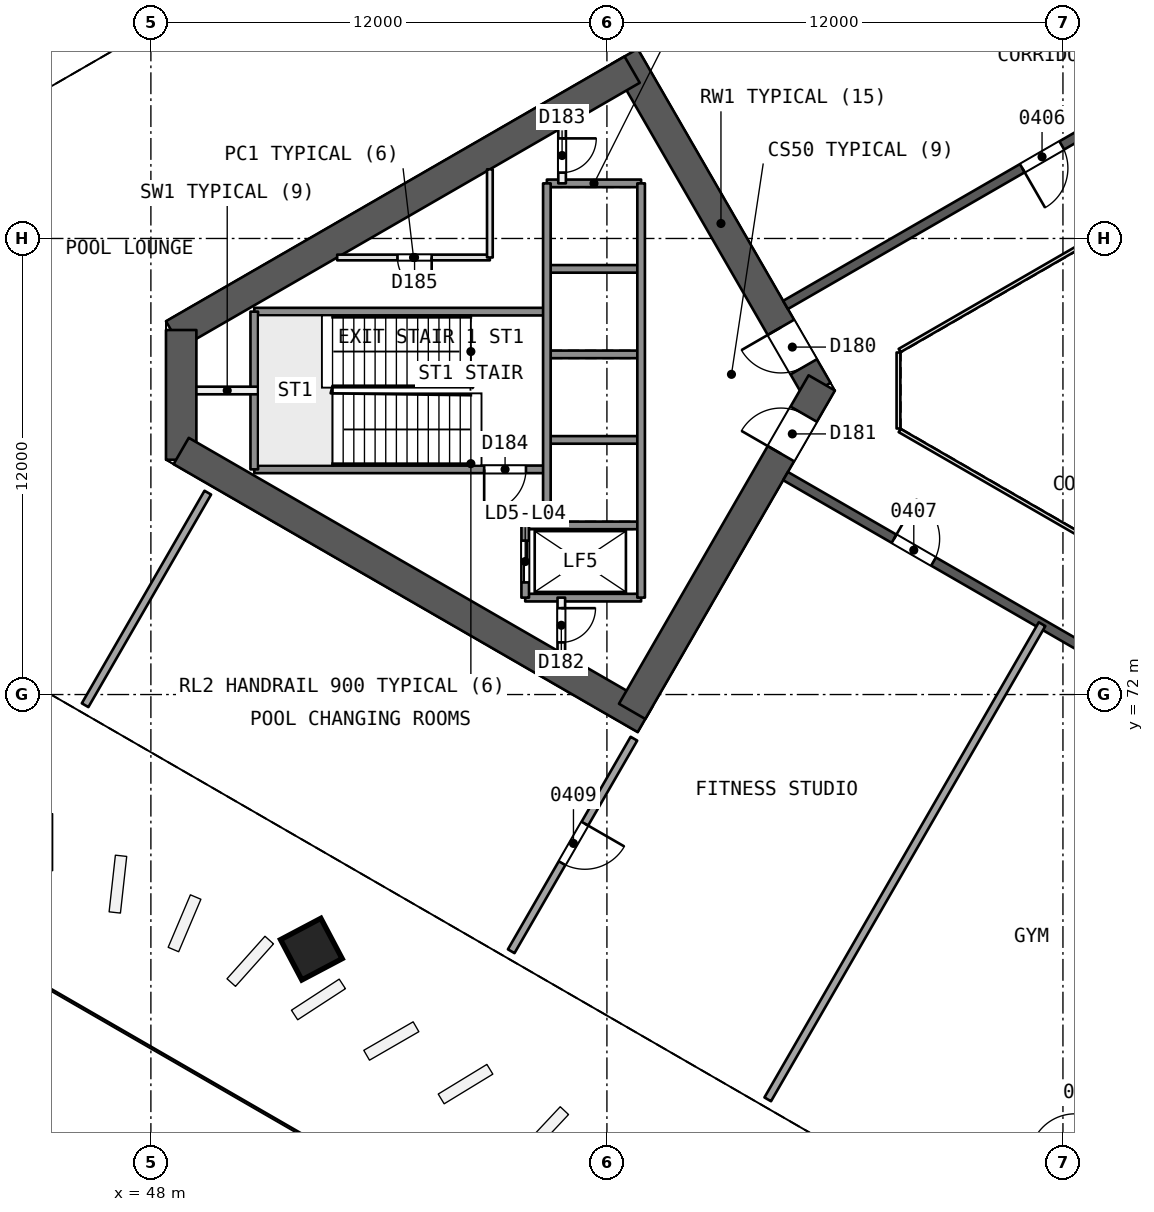
"""IFC4 building model, lengths in metres.
Left out: names, types, materials, properties, quantities, classifications, styles, units other than length and angle.
Written with IfcOpenShell. Run it as: python <this file> out.ifc"""

import sys

from ifc_helpers import new_model, si_unit, direction, frame, frame_2d, origin, origin_2d, place, context, subcontext, project, spatial, rectangle, extrude, element, fill, save


model = new_model("IFC4")
c1 = context("Model", 3, precision=1e-05, world=origin(), true_north=direction((0.0, 1.0)))
c2 = subcontext(c1, "Body", "Model", "MODEL_VIEW")
j1 = project(units=[si_unit("LENGTHUNIT", "METRE"), si_unit("PLANEANGLEUNIT", "RADIAN")], contexts=[c1])
p1 = place(None, origin())
s1 = spatial("IfcSite", under=j1, at=p1, CompositionType="ELEMENT")
p2 = place(p1, origin())
s2 = spatial("IfcBuilding", under=s1, at=p2, CompositionType="ELEMENT")
p3 = place(p2, frame((0.0, 0.0, 25.4)))
s3 = spatial("IfcBuildingStorey", under=s2, at=p3, CompositionType="ELEMENT", Elevation=25.4)
p4 = place(p3, frame((65.538, 80.0, 0.0), z_axis=(0.0, 0.0, 1.0), x_axis=(-0.49999662545, 0.866027352073, 0.0)))
e1 = element("IfcWall", 1, at=p4, inside=s3, PredefinedType="SHEAR", context=c2, shape_type="SweptSolid", body=[
    extrude(rectangle(XDim=10.149, YDim=0.8, at=frame_2d((5.074, 0.0))), origin(), (0.0, 0.0, 1.0), 4.6),
])
p5 = place(p4, frame((0.719, 0.0, 0.0)))
e2 = element("IfcOpeningElement", 2, at=p5, cuts=e1, PredefinedType="OPENING", context=c2, shape_type="SweptSolid", body=[
    extrude(rectangle(XDim=1.2, YDim=2.1, at=frame_2d((0.6, 1.05))), frame((0.0, 0.411, 0.0), z_axis=(0.0, -1.0, 0.0), x_axis=(1.0, 0.0, 0.0)), (0.0, 0.0, 1.0), 0.821),
])
p6 = place(p3, frame((60.664, 88.443, 0.0), z_axis=(0.0, 0.0, 1.0), x_axis=(-0.866029478545, -0.499992942241, 0.0)))
e3 = element("IfcWall", 3, at=p6, inside=s3, PredefinedType="SHEAR", context=c2, shape_type="SweptSolid", body=[
    extrude(rectangle(XDim=13.933, YDim=0.8, at=frame_2d((6.967, 0.0))), origin(), (0.0, 0.0, 1.0), 4.6),
])
p7 = place(p3, frame((48.797, 81.592, 0.0), z_axis=(0.0, 0.0, 1.0), x_axis=(0.0, -1.0, 0.0)))
e4 = element("IfcWall", 4, at=p7, inside=s3, PredefinedType="SHEAR", context=c2, shape_type="SweptSolid", body=[
    extrude(rectangle(XDim=3.415, YDim=0.8, at=frame_2d((1.707, 0.0))), origin(), (0.0, 0.0, 1.0), 4.6),
])
p8 = place(p3, frame((48.797, 78.408, 0.0), z_axis=(0.0, 0.0, 1.0), x_axis=(0.866032504327, -0.499987701298, 0.0)))
e5 = element("IfcWall", 5, at=p8, inside=s3, PredefinedType="SHEAR", context=c2, shape_type="SweptSolid", body=[
    extrude(rectangle(XDim=14.102, YDim=0.8, at=frame_2d((7.051, 0.0))), origin(), (0.0, 0.0, 1.0), 4.6),
])
p9 = place(p3, frame((60.664, 71.557, 0.0), z_axis=(0.0, 0.0, 1.0), x_axis=(0.50000409368, 0.866023040284, 0.0)))
e6 = element("IfcWall", 6, at=p9, inside=s3, PredefinedType="SHEAR", context=c2, shape_type="SweptSolid", body=[
    extrude(rectangle(XDim=9.98, YDim=0.8, at=frame_2d((4.99, 0.0))), origin(), (0.0, 0.0, 1.0), 4.6),
])
p10 = place(p9, frame((7.83, 0.0, 0.0)))
e7 = element("IfcOpeningElement", 7, at=p10, cuts=e6, PredefinedType="OPENING", context=c2, shape_type="SweptSolid", body=[
    extrude(rectangle(XDim=1.2, YDim=2.1, at=frame_2d((0.6, 1.05))), frame((0.0, 0.411, 0.0), z_axis=(0.0, -1.0, 0.0), x_axis=(1.0, 0.0, 0.0)), (0.0, 0.0, 1.0), 0.821),
])
p11 = place(p3, frame((78.2, 90.046, 0.0), z_axis=(0.0, 0.0, 1.0), x_axis=(-0.866026492143, -0.499998114903, 0.0)))
e8 = element("IfcWall", 8, at=p11, inside=s3, PredefinedType="SHEAR", context=c2, shape_type="SweptSolid", body=[
    extrude(rectangle(XDim=15.588, YDim=0.25, at=frame_2d((7.794, 0.0))), origin(), (0.0, 0.0, 1.0), 4.1),
])
p12 = place(p11, frame((7.194, 0.0, 0.0)))
e9 = element("IfcOpeningElement", 9, at=p12, cuts=e8, PredefinedType="OPENING", context=c2, shape_type="SweptSolid", body=[
    extrude(rectangle(XDim=1.2, YDim=2.4, at=frame_2d((0.6, 1.2))), frame((0.0, 0.135, 0.0), z_axis=(0.0, -1.0, 0.0), x_axis=(1.0, 0.0, 0.0)), (0.0, 0.0, 1.0), 0.271),
])
p13 = place(p3, frame((64.7, 77.748, 0.0), z_axis=(0.0, 0.0, 1.0), x_axis=(0.866026492143, -0.499998114903, 0.0)))
e10 = element("IfcWall", 10, at=p13, inside=s3, PredefinedType="SHEAR", context=c2, shape_type="SweptSolid", body=[
    extrude(rectangle(XDim=15.588, YDim=0.25, at=frame_2d((7.794, 0.0))), origin(), (0.0, 0.0, 1.0), 4.1),
])
p14 = place(p13, frame((3.297, 0.0, 0.0)))
e11 = element("IfcOpeningElement", 11, at=p14, cuts=e10, PredefinedType="OPENING", context=c2, shape_type="SweptSolid", body=[
    extrude(rectangle(XDim=1.2, YDim=2.4, at=frame_2d((0.6, 1.2))), frame((0.0, 0.135, 0.0), z_axis=(0.0, -1.0, 0.0), x_axis=(1.0, 0.0, 0.0)), (0.0, 0.0, 1.0), 0.271),
])
p15 = place(p13, frame((11.091, 0.0, 0.0)))
e12 = element("IfcOpeningElement", 12, at=p15, cuts=e10, PredefinedType="OPENING", context=c2, shape_type="SweptSolid", body=[
    extrude(rectangle(XDim=1.2, YDim=2.4, at=frame_2d((0.6, 1.2))), frame((0.0, 0.135, 0.0), z_axis=(0.0, -1.0, 0.0), x_axis=(1.0, 0.0, 0.0)), (0.0, 0.0, 1.0), 0.271),
])
p16 = place(p3, frame((52.199, 65.286, 0.0), z_axis=(0.01931351395, 0.012150534875, 0.999739642448), x_axis=(-0.866097413728, 0.49976162466, 0.010657788268)))
e13 = element("IfcColumn", 13, at=p16, inside=s3, PredefinedType="COLUMN", context=c2, shape_type="SweptSolid", body=[
    extrude(rectangle(XDim=1.2, YDim=1.2, at=origin_2d()), origin(), (0.0, 0.0, 1.0), 4.601),
])
p17 = place(p3, frame((64.231, 61.349, 0.0), z_axis=(0.0, 0.0, 1.0), x_axis=(0.500003999814, 0.866023094479, 0.0)))
e14 = element("IfcWall", 14, at=p17, inside=s3, PredefinedType="PARTITIONING", context=c2, shape_type="SweptSolid", body=[
    extrude(rectangle(XDim=14.437, YDim=0.2, at=frame_2d((7.219, 0.0))), origin(), (0.0, 0.0, 1.0), 4.1),
])
p18 = place(p3, frame((60.71, 70.838, 0.0), z_axis=(0.0, 0.0, 1.0), x_axis=(-0.500001702147, -0.866024421047, 0.0)))
e15 = element("IfcWall", 15, at=p18, inside=s3, PredefinedType="PARTITIONING", context=c2, shape_type="SweptSolid", body=[
    extrude(rectangle(XDim=6.458, YDim=0.2, at=frame_2d((3.229, 0.0))), origin(), (0.0, 0.0, 1.0), 4.1),
])
p19 = place(p18, frame((2.582, 0.0, 0.0)))
e16 = element("IfcOpeningElement", 16, at=p19, cuts=e15, PredefinedType="OPENING", context=c2, shape_type="SweptSolid", body=[
    extrude(rectangle(XDim=1.2, YDim=2.4, at=frame_2d((0.6, 1.2))), frame((0.0, 0.11, 0.0), z_axis=(0.0, -1.0, 0.0), x_axis=(1.0, 0.0, 0.0)), (0.0, 0.0, 1.0), 0.221),
])
p20 = place(p3, frame((70.981, 57.451, 0.0), z_axis=(0.0, 0.0, 1.0), x_axis=(0.500001702147, 0.866024421047, 0.0)))
e17 = element("IfcWall", 17, at=p20, inside=s3, PredefinedType="PARTITIONING", context=c2, shape_type="SweptSolid", body=[
    extrude(rectangle(XDim=6.458, YDim=0.2, at=frame_2d((3.229, 0.0))), origin(), (0.0, 0.0, 1.0), 4.1),
])
p21 = place(p20, frame((2.675, 0.0, 0.0)))
e18 = element("IfcOpeningElement", 18, at=p21, cuts=e17, PredefinedType="OPENING", context=c2, shape_type="SweptSolid", body=[
    extrude(rectangle(XDim=1.2, YDim=2.4, at=frame_2d((0.6, 1.2))), frame((0.0, 0.11, 0.0), z_axis=(0.0, -1.0, 0.0), x_axis=(1.0, 0.0, 0.0)), (0.0, 0.0, 1.0), 0.221),
])
p22 = place(p3, frame((49.498, 77.312, 0.0), z_axis=(0.0, 0.0, 1.0), x_axis=(-0.49998971805, -0.86603133999, 0.0)))
e19 = element("IfcWall", 19, at=p22, inside=s3, PredefinedType="PARTITIONING", context=c2, shape_type="SweptSolid", body=[
    extrude(rectangle(XDim=6.458, YDim=0.2, at=frame_2d((3.229, 0.0))), origin(), (0.0, 0.0, 1.0), 4.1),
])
p23 = place(p3, frame((60.9, 85.45, 0.0), z_axis=(0.0, 0.0, 1.0), x_axis=(-1.0, 0.0, 0.0)))
e20 = element("IfcWall", 20, at=p23, inside=s3, PredefinedType="SOLIDWALL", context=c2, shape_type="SweptSolid", body=[
    extrude(rectangle(XDim=2.48, YDim=0.2, at=frame_2d((1.24, 0.0))), origin(), (0.0, 0.0, 1.0), 4.1),
])
p24 = place(p3, frame((56.92, 83.5, 0.0), z_axis=(0.0, 0.0, 1.0), x_axis=(-1.0, 0.0, 0.0)))
e21 = element("IfcWall", 21, at=p24, inside=s3, PredefinedType="PARTITIONING", context=c2, shape_type="SweptSolid", body=[
    extrude(rectangle(XDim=4.018, YDim=0.15, at=frame_2d((2.009, 0.0))), origin(), (0.0, 0.0, 1.0), 4.1),
])
p25 = place(p24, frame((1.531, 0.0, 0.0)))
e22 = element("IfcOpeningElement", 22, at=p25, cuts=e21, PredefinedType="OPENING", context=c2, shape_type="SweptSolid", body=[
    extrude(rectangle(XDim=0.9, YDim=2.1, at=frame_2d((0.45, 1.05))), frame((0.0, 0.085, 0.0), z_axis=(0.0, -1.0, 0.0), x_axis=(1.0, 0.0, 0.0)), (0.0, 0.0, 1.0), 0.171),
])
p26 = place(p3, frame((60.9, 83.2, 0.0), z_axis=(0.0, 0.0, 1.0), x_axis=(-1.0, 0.0, 0.0)))
e23 = element("IfcWall", 23, at=p26, inside=s3, PredefinedType="SOLIDWALL", context=c2, shape_type="SweptSolid", body=[
    extrude(rectangle(XDim=2.48, YDim=0.2, at=frame_2d((1.24, 0.0))), origin(), (0.0, 0.0, 1.0), 4.1),
])
p27 = place(p3, frame((58.42, 82.075, 0.0), z_axis=(0.0, 0.0, 1.0), x_axis=(-1.0, 0.0, 0.0)))
e24 = element("IfcWall", 24, at=p27, inside=s3, PredefinedType="SOLIDWALL", context=c2, shape_type="SweptSolid", body=[
    extrude(rectangle(XDim=7.7, YDim=0.2, at=frame_2d((3.85, 0.0))), origin(), (0.0, 0.0, 1.0), 4.1),
])
p28 = place(p3, frame((60.9, 80.95, 0.0), z_axis=(0.0, 0.0, 1.0), x_axis=(-1.0, 0.0, 0.0)))
e25 = element("IfcWall", 25, at=p28, inside=s3, PredefinedType="SOLIDWALL", context=c2, shape_type="SweptSolid", body=[
    extrude(rectangle(XDim=2.48, YDim=0.2, at=frame_2d((1.24, 0.0))), origin(), (0.0, 0.0, 1.0), 4.1),
])
p29 = place(p3, frame((50.82, 80.0, 0.0), z_axis=(0.0, 0.0, 1.0), x_axis=(-1.0, 0.0, 0.0)))
e26 = element("IfcWall", 26, at=p29, inside=s3, PredefinedType="PARTITIONING", context=c2, shape_type="SweptSolid", body=[
    extrude(rectangle(XDim=1.623, YDim=0.2, at=frame_2d((0.812, 0.0))), origin(), (0.0, 0.0, 1.0), 4.1),
])
p30 = place(p3, frame((60.9, 78.7, 0.0), z_axis=(0.0, 0.0, 1.0), x_axis=(-1.0, 0.0, 0.0)))
e27 = element("IfcWall", 27, at=p30, inside=s3, PredefinedType="SOLIDWALL", context=c2, shape_type="SweptSolid", body=[
    extrude(rectangle(XDim=2.48, YDim=0.2, at=frame_2d((1.24, 0.0))), origin(), (0.0, 0.0, 1.0), 4.1),
])
p31 = place(p3, frame((58.42, 77.925, 0.0), z_axis=(0.0, 0.0, 1.0), x_axis=(-1.0, 0.0, 0.0)))
e28 = element("IfcWall", 28, at=p31, inside=s3, PredefinedType="SOLIDWALL", context=c2, shape_type="SweptSolid", body=[
    extrude(rectangle(XDim=7.7, YDim=0.2, at=frame_2d((3.85, 0.0))), origin(), (0.0, 0.0, 1.0), 4.1),
])
p32 = place(p31, frame((0.55, 0.0, 0.0)))
e29 = element("IfcOpeningElement", 29, at=p32, cuts=e28, PredefinedType="OPENING", context=c2, shape_type="SweptSolid", body=[
    extrude(rectangle(XDim=1.1, YDim=2.1, at=frame_2d((0.55, 1.05))), frame((0.0, 0.11, 0.0), z_axis=(0.0, -1.0, 0.0), x_axis=(1.0, 0.0, 0.0)), (0.0, 0.0, 1.0), 0.221),
])
for number, where, z_axis, x_axis in (
    (30, (60.9, 76.45, 0.0), (0.0, 0.0, 1.0), (-1.0, 0.0, 0.0)),
    (31, (60.9, 74.55, 0.0), (0.0, 0.0, 1.0), (-1.0, 0.0, 0.0)),
):
    element("IfcWall", number, at=place(p3, frame(where, z_axis=z_axis, x_axis=x_axis)), inside=s3, PredefinedType="SOLIDWALL", context=c2, shape_type="SweptSolid", body=[
        extrude(rectangle(XDim=3.05, YDim=0.2, at=frame_2d((1.525, 0.0))), origin(), (0.0, 0.0, 1.0), 4.1),
    ])
p33 = place(p3, frame((60.9, 85.45, 0.0), z_axis=(0.0, 0.0, 1.0), x_axis=(0.0, -1.0, 0.0)))
e32 = element("IfcWall", 32, at=p33, inside=s3, PredefinedType="SOLIDWALL", context=c2, shape_type="SweptSolid", body=[
    extrude(rectangle(XDim=10.9, YDim=0.2, at=frame_2d((5.45, 0.0))), origin(), (0.0, 0.0, 1.0), 4.1),
])
p34 = place(p3, frame((58.82, 86.917, 0.0), z_axis=(0.0, 0.0, 1.0), x_axis=(0.0, -1.0, 0.0)))
e33 = element("IfcWall", 33, at=p34, inside=s3, PredefinedType="PARTITIONING", context=c2, shape_type="SweptSolid", body=[
    extrude(rectangle(XDim=1.467, YDim=0.2, at=frame_2d((0.733, 0.0))), origin(), (0.0, 0.0, 1.0), 4.1),
])
p35 = place(p34, frame((0.283, 0.0, 0.0)))
e34 = element("IfcOpeningElement", 34, at=p35, cuts=e33, PredefinedType="OPENING", context=c2, shape_type="SweptSolid", body=[
    extrude(rectangle(XDim=0.9, YDim=2.1, at=frame_2d((0.45, 1.05))), frame((0.0, 0.11, 0.0), z_axis=(0.0, -1.0, 0.0), x_axis=(1.0, 0.0, 0.0)), (0.0, 0.0, 1.0), 0.221),
])
p36 = place(p3, frame((58.8, 74.55, 0.0), z_axis=(0.0, 0.0, 1.0), x_axis=(0.0, -1.0, 0.0)))
e35 = element("IfcWall", 35, at=p36, inside=s3, PredefinedType="PARTITIONING", context=c2, shape_type="SweptSolid", body=[
    extrude(rectangle(XDim=1.455, YDim=0.2, at=frame_2d((0.728, 0.0))), origin(), (0.0, 0.0, 1.0), 4.1),
])
p37 = place(p36, frame((0.278, 0.0, 0.0)))
e36 = element("IfcOpeningElement", 36, at=p37, cuts=e35, PredefinedType="OPENING", context=c2, shape_type="SweptSolid", body=[
    extrude(rectangle(XDim=0.9, YDim=2.1, at=frame_2d((0.45, 1.05))), frame((0.0, 0.11, 0.0), z_axis=(0.0, -1.0, 0.0), x_axis=(1.0, 0.0, 0.0)), (0.0, 0.0, 1.0), 0.221),
])
p38 = place(p3, frame((58.42, 85.45, 0.0), z_axis=(0.0, 0.0, 1.0), x_axis=(0.0, -1.0, 0.0)))
e37 = element("IfcWall", 37, at=p38, inside=s3, PredefinedType="SOLIDWALL", context=c2, shape_type="SweptSolid", body=[
    extrude(rectangle(XDim=9.0, YDim=0.2, at=frame_2d((4.5, 0.0))), origin(), (0.0, 0.0, 1.0), 4.1),
])
p39 = place(p3, frame((57.85, 76.45, 0.0), z_axis=(0.0, 0.0, 1.0), x_axis=(0.0, -1.0, 0.0)))
e38 = element("IfcWall", 38, at=p39, inside=s3, PredefinedType="SOLIDWALL", context=c2, shape_type="SweptSolid", body=[
    extrude(rectangle(XDim=1.9, YDim=0.2, at=frame_2d((0.95, 0.0))), origin(), (0.0, 0.0, 1.0), 4.1),
])
p40 = place(p39, frame((0.4, 0.0, 0.0)))
e39 = element("IfcOpeningElement", 39, at=p40, cuts=e38, PredefinedType="OPENING", context=c2, shape_type="SweptSolid", body=[
    extrude(rectangle(XDim=1.1, YDim=2.1, at=frame_2d((0.55, 1.05))), frame((0.0, 0.11, 0.0), z_axis=(0.0, -1.0, 0.0), x_axis=(1.0, 0.0, 0.0)), (0.0, 0.0, 1.0), 0.221),
])
p41 = place(p3, frame((56.92, 85.82, 0.0), z_axis=(0.0, 0.0, 1.0), x_axis=(0.0, -1.0, 0.0)))
e40 = element("IfcWall", 40, at=p41, inside=s3, PredefinedType="PARTITIONING", context=c2, shape_type="SweptSolid", body=[
    extrude(rectangle(XDim=2.32, YDim=0.15, at=frame_2d((1.16, 0.0))), origin(), (0.0, 0.0, 1.0), 4.1),
])
p42 = place(p3, frame((50.72, 82.075, 0.0), z_axis=(0.0, 0.0, 1.0), x_axis=(0.0, -1.0, 0.0)))
e41 = element("IfcWall", 41, at=p42, inside=s3, PredefinedType="SOLIDWALL", context=c2, shape_type="SweptSolid", body=[
    extrude(rectangle(XDim=4.15, YDim=0.2, at=frame_2d((2.075, 0.0))), origin(), (0.0, 0.0, 1.0), 4.1),
])
p43 = place(p3, frame((77.738, 86.846, 0.0), z_axis=(0.0, 0.0, 1.0), x_axis=(-0.866026658274, -0.499997827154, 0.0)))
e42 = element("IfcWall", 42, at=p43, inside=s3, PredefinedType="PARTITIONING", context=c2, shape_type="SweptSolid", body=[
    extrude(rectangle(XDim=11.588, YDim=0.1, at=frame_2d((5.794, 0.0))), origin(), (0.0, 0.0, 1.0), 4.1),
])
p44 = place(p3, frame((67.672, 81.0, 0.0), z_axis=(0.0, 0.0, 1.0), x_axis=(0.0, -1.0, 0.0)))
e43 = element("IfcWall", 43, at=p44, inside=s3, PredefinedType="PARTITIONING", context=c2, shape_type="SweptSolid", body=[
    extrude(rectangle(XDim=2.0, YDim=0.1, at=frame_2d((1.0, 0.0))), origin(), (0.0, 0.0, 1.0), 4.1),
])
p45 = place(p3, frame((67.702, 78.948, 0.0), z_axis=(0.0, 0.0, 1.0), x_axis=(0.866026658274, -0.499997827154, 0.0)))
e44 = element("IfcWall", 44, at=p45, inside=s3, PredefinedType="PARTITIONING", context=c2, shape_type="SweptSolid", body=[
    extrude(rectangle(XDim=11.588, YDim=0.1, at=frame_2d((5.794, 0.0))), origin(), (0.0, 0.0, 1.0), 4.1),
])
p46 = place(p12, origin())
e45 = element("IfcDoor", 45, at=p46, inside=s3, OperationType="SINGLE_SWING_RIGHT", PredefinedType="NOTDEFINED", context=c2, shape_type="SweptSolid", body=[
    extrude(rectangle(XDim=1.2, YDim=2.4, at=frame_2d((0.6, 1.2))), frame((0.0, 0.025, 0.0), z_axis=(0.0, -1.0, 0.0), x_axis=(1.0, 0.0, 0.0)), (0.0, 0.0, 1.0), 0.05),
])
fill(e9, e45)
p47 = place(p14, origin())
e46 = element("IfcDoor", 46, at=p47, inside=s3, OperationType="SINGLE_SWING_LEFT", PredefinedType="NOTDEFINED", context=c2, shape_type="SweptSolid", body=[
    extrude(rectangle(XDim=1.2, YDim=2.4, at=frame_2d((0.6, 1.2))), frame((0.0, 0.025, 0.0), z_axis=(0.0, -1.0, 0.0), x_axis=(1.0, 0.0, 0.0)), (0.0, 0.0, 1.0), 0.05),
])
fill(e11, e46)
p48 = place(p19, origin())
e47 = element("IfcDoor", 47, at=p48, inside=s3, OperationType="SINGLE_SWING_LEFT", PredefinedType="NOTDEFINED", context=c2, shape_type="SweptSolid", body=[
    extrude(rectangle(XDim=1.2, YDim=2.4, at=frame_2d((0.6, 1.2))), frame((0.0, 0.025, 0.0), z_axis=(0.0, -1.0, 0.0), x_axis=(1.0, 0.0, 0.0)), (0.0, 0.0, 1.0), 0.05),
])
fill(e16, e47)
p49 = place(p21, origin())
e48 = element("IfcDoor", 48, at=p49, inside=s3, OperationType="SINGLE_SWING_LEFT", PredefinedType="NOTDEFINED", context=c2, shape_type="SweptSolid", body=[
    extrude(rectangle(XDim=1.2, YDim=2.4, at=frame_2d((0.6, 1.2))), frame((0.0, 0.025, 0.0), z_axis=(0.0, -1.0, 0.0), x_axis=(1.0, 0.0, 0.0)), (0.0, 0.0, 1.0), 0.05),
])
fill(e18, e48)
p50 = place(p5, origin())
e49 = element("IfcDoor", 49, at=p50, inside=s3, OperationType="SINGLE_SWING_RIGHT", PredefinedType="NOTDEFINED", context=c2, shape_type="SweptSolid", body=[
    extrude(rectangle(XDim=1.2, YDim=2.1, at=frame_2d((0.6, 1.05))), frame((0.0, 0.025, 0.0), z_axis=(0.0, -1.0, 0.0), x_axis=(1.0, 0.0, 0.0)), (0.0, 0.0, 1.0), 0.05),
])
fill(e2, e49)
p51 = place(p10, origin())
e50 = element("IfcDoor", 50, at=p51, inside=s3, OperationType="SINGLE_SWING_LEFT", PredefinedType="NOTDEFINED", context=c2, shape_type="SweptSolid", body=[
    extrude(rectangle(XDim=1.2, YDim=2.1, at=frame_2d((0.6, 1.05))), frame((0.0, 0.025, 0.0), z_axis=(0.0, -1.0, 0.0), x_axis=(1.0, 0.0, 0.0)), (0.0, 0.0, 1.0), 0.05),
])
fill(e7, e50)
p52 = place(p40, origin())
e51 = element("IfcDoor", 51, at=p52, inside=s3, OperationType="SLIDING_TO_RIGHT", PredefinedType="NOTDEFINED", context=c2, shape_type="SweptSolid", body=[
    extrude(rectangle(XDim=1.1, YDim=2.1, at=frame_2d((0.55, 1.05))), frame((0.0, 0.025, 0.0), z_axis=(0.0, -1.0, 0.0), x_axis=(1.0, 0.0, 0.0)), (0.0, 0.0, 1.0), 0.05),
])
fill(e39, e51)
p53 = place(p37, origin())
e52 = element("IfcDoor", 52, at=p53, inside=s3, OperationType="SINGLE_SWING_LEFT", PredefinedType="NOTDEFINED", context=c2, shape_type="SweptSolid", body=[
    extrude(rectangle(XDim=0.9, YDim=2.1, at=frame_2d((0.45, 1.05))), frame((0.0, 0.025, 0.0), z_axis=(0.0, -1.0, 0.0), x_axis=(1.0, 0.0, 0.0)), (0.0, 0.0, 1.0), 0.05),
])
fill(e36, e52)
p54 = place(p35, origin())
e53 = element("IfcDoor", 53, at=p54, inside=s3, OperationType="SINGLE_SWING_LEFT", PredefinedType="NOTDEFINED", context=c2, shape_type="SweptSolid", body=[
    extrude(rectangle(XDim=0.9, YDim=2.1, at=frame_2d((0.45, 1.05))), frame((0.0, 0.025, 0.0), z_axis=(0.0, -1.0, 0.0), x_axis=(1.0, 0.0, 0.0)), (0.0, 0.0, 1.0), 0.05),
])
fill(e34, e53)
p55 = place(p32, origin())
e54 = element("IfcDoor", 54, at=p55, inside=s3, OperationType="SINGLE_SWING_RIGHT", PredefinedType="NOTDEFINED", context=c2, shape_type="SweptSolid", body=[
    extrude(rectangle(XDim=1.1, YDim=2.1, at=frame_2d((0.55, 1.05))), frame((0.0, 0.025, 0.0), z_axis=(0.0, -1.0, 0.0), x_axis=(1.0, 0.0, 0.0)), (0.0, 0.0, 1.0), 0.05),
])
fill(e29, e54)
p56 = place(p25, origin())
e55 = element("IfcDoor", 55, at=p56, inside=s3, OperationType="SINGLE_SWING_LEFT", PredefinedType="NOTDEFINED", context=c2, shape_type="SweptSolid", body=[
    extrude(rectangle(XDim=0.9, YDim=2.1, at=frame_2d((0.45, 1.05))), frame((0.0, 0.025, 0.0), z_axis=(0.0, -1.0, 0.0), x_axis=(1.0, 0.0, 0.0)), (0.0, 0.0, 1.0), 0.05),
])
fill(e22, e55)
save(model, sys.argv[1])
